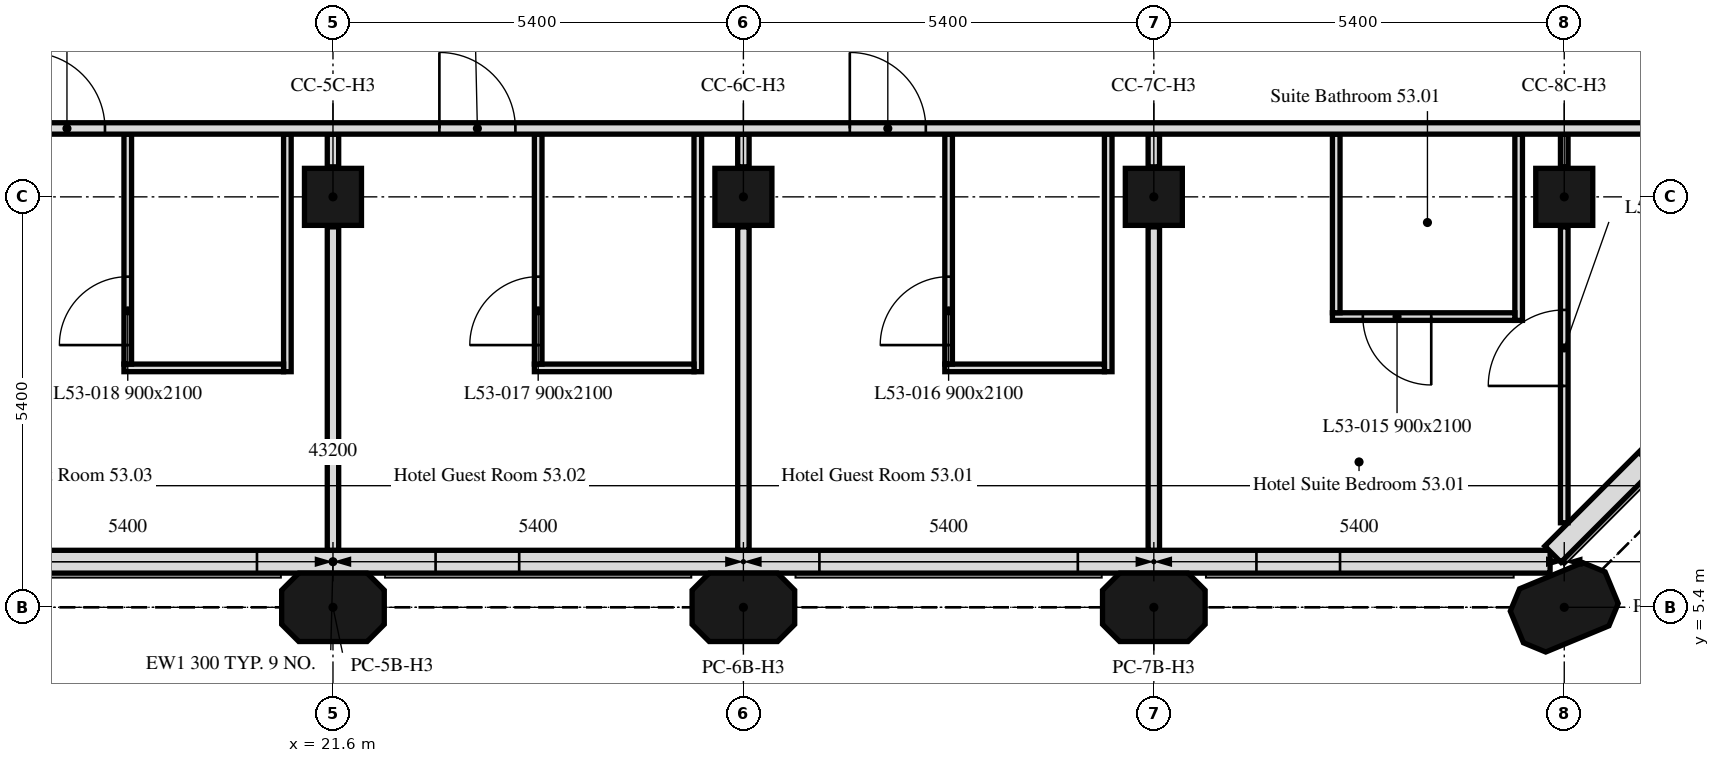
"""IFC4 building model, lengths in metres.
Left out: names, types, materials, properties, quantities, classifications, styles, units other than length and angle.
Written with IfcOpenShell. Run it as: python <this file> out.ifc"""

import sys

from ifc_helpers import new_model, si_unit, direction, frame, frame_2d, origin, origin_2d, place, context, subcontext, project, spatial, polyline, rectangle, outline, extrude, element, fill, save


model = new_model("IFC4")
c1 = context("Model", 3, precision=1e-05, world=origin(), true_north=direction((0.0, 1.0)))
c2 = subcontext(c1, "Body", "Model", "MODEL_VIEW")
j1 = project(units=[si_unit("LENGTHUNIT", "METRE"), si_unit("PLANEANGLEUNIT", "RADIAN")], contexts=[c1])
p1 = place(None, origin())
s1 = spatial("IfcSite", under=j1, at=p1, CompositionType="ELEMENT")
p2 = place(p1, origin())
s2 = spatial("IfcBuilding", under=s1, at=p2, CompositionType="ELEMENT")
p3 = place(p2, frame((0.0, 0.0, 213.7)))
s3 = spatial("IfcBuildingStorey", under=s2, at=p3, CompositionType="ELEMENT", Elevation=213.7)
for number, where, z_axis, x_axis in (
    (1, (21.6, 5.4, 0.0), (0.0, 0.0, 1.0), (1.0, 0.0, 0.0)),
    (2, (27.0, 5.4, 0.0), (0.0, 0.0, 1.0), (1.0, 0.0, 0.0)),
    (3, (32.4, 5.4, 0.0), (0.0, 0.0, 1.0), (1.0, 0.0, 0.0)),
    (4, (37.8, 5.4, 0.0), (0.0, 0.0, 1.0), (0.924, 0.383, 0.0)),
):
    element("IfcColumn", number, at=place(p3, frame(where, z_axis=z_axis, x_axis=x_axis)), inside=s3, PredefinedType="COLUMN", context=c2, shape_type="SweptSolid", body=[
        extrude(outline(polyline([(-0.45, -0.45), (0.45, -0.45), (0.675, -0.225), (0.675, 0.225), (0.45, 0.45), (-0.45, 0.45), (-0.675, 0.225), (-0.675, -0.225), (-0.45, -0.45)])), origin(), (0.0, 0.0, 1.0), 3.0),
    ])
for number, where, z_axis, x_axis in (
    (5, (21.6, 10.8, 0.0), (0.0, 0.0, 1.0), (1.0, 0.0, 0.0)),
    (6, (27.0, 10.8, 0.0), (0.0, 0.0, 1.0), (1.0, 0.0, 0.0)),
    (7, (32.4, 10.8, 0.0), (0.0, 0.0, 1.0), (1.0, 0.0, 0.0)),
    (8, (37.8, 10.8, 0.0), (0.0, 0.0, 1.0), (1.0, 0.0, 0.0)),
):
    element("IfcColumn", number, at=place(p3, frame(where, z_axis=z_axis, x_axis=x_axis)), inside=s3, PredefinedType="COLUMN", context=c2, shape_type="SweptSolid", body=[
        extrude(rectangle(XDim=0.75, YDim=0.75, at=origin_2d()), origin(), (0.0, 0.0, 1.0), 3.0),
    ])
p4 = place(p3, frame((5.586, 6.0, 0.0), z_axis=(0.0, 0.0, 1.0), x_axis=(1.0, 0.0, 0.0)))
e9 = element("IfcWall", 9, at=p4, inside=s3, PredefinedType="SOLIDWALL", context=c2, shape_type="SweptSolid", body=[
    extrude(rectangle(XDim=32.027, YDim=0.3, at=frame_2d((16.014, 0.0))), origin(), (0.0, 0.0, 1.0), 3.0),
])
p5 = place(p4, frame((0.814, 0.0, 0.9)))
e10 = element("IfcOpeningElement", 10, at=p5, cuts=e9, PredefinedType="OPENING", context=c2, shape_type="SweptSolid", body=[
    extrude(rectangle(XDim=3.4, YDim=1.7, at=frame_2d((1.7, 0.85))), frame((0.0, 0.16, 0.0), z_axis=(0.0, -1.0, 0.0), x_axis=(1.0, 0.0, 0.0)), (0.0, 0.0, 1.0), 0.32),
])
p6 = place(p4, frame((6.564, 0.0, 0.9)))
e11 = element("IfcOpeningElement", 11, at=p6, cuts=e9, PredefinedType="OPENING", context=c2, shape_type="SweptSolid", body=[
    extrude(rectangle(XDim=1.1, YDim=1.7, at=frame_2d((0.55, 0.85))), frame((0.0, 0.16, 0.0), z_axis=(0.0, -1.0, 0.0), x_axis=(1.0, 0.0, 0.0)), (0.0, 0.0, 1.0), 0.32),
])
p7 = place(p4, frame((11.614, 0.0, 0.9)))
e12 = element("IfcOpeningElement", 12, at=p7, cuts=e9, PredefinedType="OPENING", context=c2, shape_type="SweptSolid", body=[
    extrude(rectangle(XDim=3.4, YDim=1.7, at=frame_2d((1.7, 0.85))), frame((0.0, 0.16, 0.0), z_axis=(0.0, -1.0, 0.0), x_axis=(1.0, 0.0, 0.0)), (0.0, 0.0, 1.0), 0.32),
])
p8 = place(p4, frame((17.364, 0.0, 0.9)))
e13 = element("IfcOpeningElement", 13, at=p8, cuts=e9, PredefinedType="OPENING", context=c2, shape_type="SweptSolid", body=[
    extrude(rectangle(XDim=1.1, YDim=1.7, at=frame_2d((0.55, 0.85))), frame((0.0, 0.16, 0.0), z_axis=(0.0, -1.0, 0.0), x_axis=(1.0, 0.0, 0.0)), (0.0, 0.0, 1.0), 0.32),
])
p9 = place(p4, frame((22.414, 0.0, 0.9)))
e14 = element("IfcOpeningElement", 14, at=p9, cuts=e9, PredefinedType="OPENING", context=c2, shape_type="SweptSolid", body=[
    extrude(rectangle(XDim=3.4, YDim=1.7, at=frame_2d((1.7, 0.85))), frame((0.0, 0.16, 0.0), z_axis=(0.0, -1.0, 0.0), x_axis=(1.0, 0.0, 0.0)), (0.0, 0.0, 1.0), 0.32),
])
p10 = place(p4, frame((28.164, 0.0, 0.9)))
e15 = element("IfcOpeningElement", 15, at=p10, cuts=e9, PredefinedType="OPENING", context=c2, shape_type="SweptSolid", body=[
    extrude(rectangle(XDim=1.1, YDim=1.7, at=frame_2d((0.55, 0.85))), frame((0.0, 0.16, 0.0), z_axis=(0.0, -1.0, 0.0), x_axis=(1.0, 0.0, 0.0)), (0.0, 0.0, 1.0), 0.32),
])
p11 = place(p3, frame((37.65, 6.099, 0.0), z_axis=(0.0, 0.0, 1.0), x_axis=(0.707106781187, 0.707106781187, 0.0)))
e16 = element("IfcWall", 16, at=p11, inside=s3, PredefinedType="SOLIDWALL", context=c2, shape_type="SweptSolid", body=[
    extrude(rectangle(XDim=6.86, YDim=0.3, at=frame_2d((3.43, 0.0))), origin(), (0.0, 0.0, 1.0), 3.0),
])
p12 = place(p11, frame((1.73, 0.0, 0.9)))
e17 = element("IfcOpeningElement", 17, at=p12, cuts=e16, PredefinedType="OPENING", context=c2, shape_type="SweptSolid", body=[
    extrude(rectangle(XDim=3.4, YDim=1.7, at=frame_2d((1.7, 0.85))), frame((0.0, 0.16, 0.0), z_axis=(0.0, -1.0, 0.0), x_axis=(1.0, 0.0, 0.0)), (0.0, 0.0, 1.0), 0.32),
])
p13 = place(p3, frame((37.8, 6.512, 0.0), z_axis=(0.0, 0.0, 1.0), x_axis=(0.0, 1.0, 0.0)))
e18 = element("IfcWall", 18, at=p13, inside=s3, PredefinedType="PARTITIONING", context=c2, shape_type="SweptSolid", body=[
    extrude(rectangle(XDim=3.893, YDim=0.1, at=frame_2d((1.946, 0.0))), origin(), (0.0, 0.0, 1.0), 3.0),
])
p14 = place(p13, frame((1.8, 0.0, 0.0)))
e19 = element("IfcOpeningElement", 19, at=p14, cuts=e18, PredefinedType="OPENING", context=c2, shape_type="SweptSolid", body=[
    extrude(rectangle(XDim=1.0, YDim=2.1, at=frame_2d((0.5, 1.05))), frame((0.0, 0.05, 0.0), z_axis=(0.0, -1.0, 0.0), x_axis=(1.0, 0.0, 0.0)), (0.0, 0.0, 1.0), 0.1),
])
p15 = place(p3, frame((37.8, 11.195, 0.0), z_axis=(0.0, 0.0, 1.0), x_axis=(0.0, 1.0, 0.0)))
e20 = element("IfcWall", 20, at=p15, inside=s3, PredefinedType="PARTITIONING", context=c2, shape_type="SweptSolid", body=[
    extrude(rectangle(XDim=0.43, YDim=0.1, at=frame_2d((0.215, 0.0))), origin(), (0.0, 0.0, 1.0), 3.0),
])
p16 = place(p3, frame((37.2, 11.625, 0.0), z_axis=(0.0, 0.0, 1.0), x_axis=(0.0, -1.0, 0.0)))
e21 = element("IfcWall", 21, at=p16, inside=s3, PredefinedType="PARTITIONING", context=c2, shape_type="SweptSolid", body=[
    extrude(rectangle(XDim=2.45, YDim=0.1, at=frame_2d((1.225, 0.0))), origin(), (0.0, 0.0, 1.0), 3.0),
])
p17 = place(p3, frame((37.15, 9.225, 0.0), z_axis=(0.0, 0.0, 1.0), x_axis=(-1.0, 0.0, 0.0)))
e22 = element("IfcWall", 22, at=p17, inside=s3, PredefinedType="PARTITIONING", context=c2, shape_type="SweptSolid", body=[
    extrude(rectangle(XDim=2.4, YDim=0.1, at=frame_2d((1.2, 0.0))), origin(), (0.0, 0.0, 1.0), 3.0),
])
p18 = place(p17, frame((1.1, 0.0, 0.0)))
e23 = element("IfcOpeningElement", 23, at=p18, cuts=e22, PredefinedType="OPENING", context=c2, shape_type="SweptSolid", body=[
    extrude(rectangle(XDim=0.9, YDim=2.1, at=frame_2d((0.45, 1.05))), frame((0.0, 0.05, 0.0), z_axis=(0.0, -1.0, 0.0), x_axis=(1.0, 0.0, 0.0)), (0.0, 0.0, 1.0), 0.1),
])
p19 = place(p3, frame((34.8, 9.275, 0.0), z_axis=(0.0, 0.0, 1.0), x_axis=(0.0, 1.0, 0.0)))
e24 = element("IfcWall", 24, at=p19, inside=s3, PredefinedType="PARTITIONING", context=c2, shape_type="SweptSolid", body=[
    extrude(rectangle(XDim=2.35, YDim=0.1, at=frame_2d((1.175, 0.0))), origin(), (0.0, 0.0, 1.0), 3.0),
])
p20 = place(p3, frame((32.4, 11.625, 0.0), z_axis=(0.0, 0.0, 1.0), x_axis=(0.0, -1.0, 0.0)))
e25 = element("IfcWall", 25, at=p20, inside=s3, PredefinedType="PARTITIONING", context=c2, shape_type="SweptSolid", body=[
    extrude(rectangle(XDim=0.43, YDim=0.15, at=frame_2d((0.215, 0.0))), origin(), (0.0, 0.0, 1.0), 3.0),
])
p21 = place(p3, frame((32.4, 10.405, 0.0), z_axis=(0.0, 0.0, 1.0), x_axis=(0.0, -1.0, 0.0)))
e26 = element("IfcWall", 26, at=p21, inside=s3, PredefinedType="PARTITIONING", context=c2, shape_type="SweptSolid", body=[
    extrude(rectangle(XDim=4.254, YDim=0.15, at=frame_2d((2.127, 0.0))), origin(), (0.0, 0.0, 1.0), 3.0),
])
p22 = place(p3, frame((31.8, 11.625, 0.0), z_axis=(0.0, 0.0, 1.0), x_axis=(0.0, -1.0, 0.0)))
e27 = element("IfcWall", 27, at=p22, inside=s3, PredefinedType="PARTITIONING", context=c2, shape_type="SweptSolid", body=[
    extrude(rectangle(XDim=3.125, YDim=0.1, at=frame_2d((1.562, 0.0))), origin(), (0.0, 0.0, 1.0), 3.0),
])
p23 = place(p3, frame((31.75, 8.55, 0.0), z_axis=(0.0, 0.0, 1.0), x_axis=(-1.0, 0.0, 0.0)))
e28 = element("IfcWall", 28, at=p23, inside=s3, PredefinedType="PARTITIONING", context=c2, shape_type="SweptSolid", body=[
    extrude(rectangle(XDim=2.1, YDim=0.1, at=frame_2d((1.05, 0.0))), origin(), (0.0, 0.0, 1.0), 3.0),
])
p24 = place(p3, frame((29.7, 8.6, 0.0), z_axis=(0.0, 0.0, 1.0), x_axis=(0.0, 1.0, 0.0)))
e29 = element("IfcWall", 29, at=p24, inside=s3, PredefinedType="PARTITIONING", context=c2, shape_type="SweptSolid", body=[
    extrude(rectangle(XDim=3.025, YDim=0.1, at=frame_2d((1.512, 0.0))), origin(), (0.0, 0.0, 1.0), 3.0),
])
p25 = place(p24, frame((0.25, 0.0, 0.0)))
e30 = element("IfcOpeningElement", 30, at=p25, cuts=e29, PredefinedType="OPENING", context=c2, shape_type="SweptSolid", body=[
    extrude(rectangle(XDim=0.9, YDim=2.1, at=frame_2d((0.45, 1.05))), frame((0.0, 0.05, 0.0), z_axis=(0.0, -1.0, 0.0), x_axis=(1.0, 0.0, 0.0)), (0.0, 0.0, 1.0), 0.1),
])
p26 = place(p3, frame((27.0, 11.625, 0.0), z_axis=(0.0, 0.0, 1.0), x_axis=(0.0, -1.0, 0.0)))
e31 = element("IfcWall", 31, at=p26, inside=s3, PredefinedType="PARTITIONING", context=c2, shape_type="SweptSolid", body=[
    extrude(rectangle(XDim=0.43, YDim=0.15, at=frame_2d((0.215, 0.0))), origin(), (0.0, 0.0, 1.0), 3.0),
])
p27 = place(p3, frame((27.0, 10.405, 0.0), z_axis=(0.0, 0.0, 1.0), x_axis=(0.0, -1.0, 0.0)))
e32 = element("IfcWall", 32, at=p27, inside=s3, PredefinedType="PARTITIONING", context=c2, shape_type="SweptSolid", body=[
    extrude(rectangle(XDim=4.254, YDim=0.15, at=frame_2d((2.127, 0.0))), origin(), (0.0, 0.0, 1.0), 3.0),
])
p28 = place(p3, frame((26.4, 11.625, 0.0), z_axis=(0.0, 0.0, 1.0), x_axis=(0.0, -1.0, 0.0)))
e33 = element("IfcWall", 33, at=p28, inside=s3, PredefinedType="PARTITIONING", context=c2, shape_type="SweptSolid", body=[
    extrude(rectangle(XDim=3.125, YDim=0.1, at=frame_2d((1.562, 0.0))), origin(), (0.0, 0.0, 1.0), 3.0),
])
p29 = place(p3, frame((26.35, 8.55, 0.0), z_axis=(0.0, 0.0, 1.0), x_axis=(-1.0, 0.0, 0.0)))
e34 = element("IfcWall", 34, at=p29, inside=s3, PredefinedType="PARTITIONING", context=c2, shape_type="SweptSolid", body=[
    extrude(rectangle(XDim=2.1, YDim=0.1, at=frame_2d((1.05, 0.0))), origin(), (0.0, 0.0, 1.0), 3.0),
])
p30 = place(p3, frame((24.3, 8.6, 0.0), z_axis=(0.0, 0.0, 1.0), x_axis=(0.0, 1.0, 0.0)))
e35 = element("IfcWall", 35, at=p30, inside=s3, PredefinedType="PARTITIONING", context=c2, shape_type="SweptSolid", body=[
    extrude(rectangle(XDim=3.025, YDim=0.1, at=frame_2d((1.512, 0.0))), origin(), (0.0, 0.0, 1.0), 3.0),
])
p31 = place(p30, frame((0.25, 0.0, 0.0)))
e36 = element("IfcOpeningElement", 36, at=p31, cuts=e35, PredefinedType="OPENING", context=c2, shape_type="SweptSolid", body=[
    extrude(rectangle(XDim=0.9, YDim=2.1, at=frame_2d((0.45, 1.05))), frame((0.0, 0.05, 0.0), z_axis=(0.0, -1.0, 0.0), x_axis=(1.0, 0.0, 0.0)), (0.0, 0.0, 1.0), 0.1),
])
p32 = place(p3, frame((21.6, 11.625, 0.0), z_axis=(0.0, 0.0, 1.0), x_axis=(0.0, -1.0, 0.0)))
e37 = element("IfcWall", 37, at=p32, inside=s3, PredefinedType="PARTITIONING", context=c2, shape_type="SweptSolid", body=[
    extrude(rectangle(XDim=0.43, YDim=0.15, at=frame_2d((0.215, 0.0))), origin(), (0.0, 0.0, 1.0), 3.0),
])
p33 = place(p3, frame((21.6, 10.405, 0.0), z_axis=(0.0, 0.0, 1.0), x_axis=(0.0, -1.0, 0.0)))
e38 = element("IfcWall", 38, at=p33, inside=s3, PredefinedType="PARTITIONING", context=c2, shape_type="SweptSolid", body=[
    extrude(rectangle(XDim=4.254, YDim=0.15, at=frame_2d((2.127, 0.0))), origin(), (0.0, 0.0, 1.0), 3.0),
])
p34 = place(p3, frame((21.0, 11.625, 0.0), z_axis=(0.0, 0.0, 1.0), x_axis=(0.0, -1.0, 0.0)))
e39 = element("IfcWall", 39, at=p34, inside=s3, PredefinedType="PARTITIONING", context=c2, shape_type="SweptSolid", body=[
    extrude(rectangle(XDim=3.125, YDim=0.1, at=frame_2d((1.562, 0.0))), origin(), (0.0, 0.0, 1.0), 3.0),
])
p35 = place(p3, frame((20.95, 8.55, 0.0), z_axis=(0.0, 0.0, 1.0), x_axis=(-1.0, 0.0, 0.0)))
e40 = element("IfcWall", 40, at=p35, inside=s3, PredefinedType="PARTITIONING", context=c2, shape_type="SweptSolid", body=[
    extrude(rectangle(XDim=2.1, YDim=0.1, at=frame_2d((1.05, 0.0))), origin(), (0.0, 0.0, 1.0), 3.0),
])
p36 = place(p3, frame((18.9, 8.6, 0.0), z_axis=(0.0, 0.0, 1.0), x_axis=(0.0, 1.0, 0.0)))
e41 = element("IfcWall", 41, at=p36, inside=s3, PredefinedType="PARTITIONING", context=c2, shape_type="SweptSolid", body=[
    extrude(rectangle(XDim=3.025, YDim=0.1, at=frame_2d((1.512, 0.0))), origin(), (0.0, 0.0, 1.0), 3.0),
])
p37 = place(p36, frame((0.25, 0.0, 0.0)))
e42 = element("IfcOpeningElement", 42, at=p37, cuts=e41, PredefinedType="OPENING", context=c2, shape_type="SweptSolid", body=[
    extrude(rectangle(XDim=0.9, YDim=2.1, at=frame_2d((0.45, 1.05))), frame((0.0, 0.05, 0.0), z_axis=(0.0, -1.0, 0.0), x_axis=(1.0, 0.0, 0.0)), (0.0, 0.0, 1.0), 0.1),
])
p38 = place(p3, frame((0.751, 11.7, 0.0), z_axis=(0.0, 0.0, 1.0), x_axis=(1.0, 0.0, 0.0)))
e43 = element("IfcWall", 43, at=p38, inside=s3, PredefinedType="PARTITIONING", context=c2, shape_type="SweptSolid", body=[
    extrude(rectangle(XDim=41.698, YDim=0.15, at=frame_2d((20.849, 0.0))), origin(), (0.0, 0.0, 1.0), 3.0),
])
p39 = place(p38, frame((39.249, 0.0, 0.0)))
e44 = element("IfcOpeningElement", 44, at=p39, cuts=e43, PredefinedType="OPENING", context=c2, shape_type="SweptSolid", body=[
    extrude(rectangle(XDim=1.0, YDim=2.1, at=frame_2d((0.5, 1.05))), frame((0.0, 0.075, 0.0), z_axis=(0.0, -1.0, 0.0), x_axis=(1.0, 0.0, 0.0)), (0.0, 0.0, 1.0), 0.15),
])
p40 = place(p38, frame((27.649, 0.0, 0.0)))
e45 = element("IfcOpeningElement", 45, at=p40, cuts=e43, PredefinedType="OPENING", context=c2, shape_type="SweptSolid", body=[
    extrude(rectangle(XDim=1.0, YDim=2.1, at=frame_2d((0.5, 1.05))), frame((0.0, 0.075, 0.0), z_axis=(0.0, -1.0, 0.0), x_axis=(1.0, 0.0, 0.0)), (0.0, 0.0, 1.0), 0.15),
])
p41 = place(p38, frame((22.249, 0.0, 0.0)))
e46 = element("IfcOpeningElement", 46, at=p41, cuts=e43, PredefinedType="OPENING", context=c2, shape_type="SweptSolid", body=[
    extrude(rectangle(XDim=1.0, YDim=2.1, at=frame_2d((0.5, 1.05))), frame((0.0, 0.075, 0.0), z_axis=(0.0, -1.0, 0.0), x_axis=(1.0, 0.0, 0.0)), (0.0, 0.0, 1.0), 0.15),
])
p42 = place(p38, frame((16.849, 0.0, 0.0)))
e47 = element("IfcOpeningElement", 47, at=p42, cuts=e43, PredefinedType="OPENING", context=c2, shape_type="SweptSolid", body=[
    extrude(rectangle(XDim=1.0, YDim=2.1, at=frame_2d((0.5, 1.05))), frame((0.0, 0.075, 0.0), z_axis=(0.0, -1.0, 0.0), x_axis=(1.0, 0.0, 0.0)), (0.0, 0.0, 1.0), 0.15),
])
p43 = place(p38, frame((11.449, 0.0, 0.0)))
e48 = element("IfcOpeningElement", 48, at=p43, cuts=e43, PredefinedType="OPENING", context=c2, shape_type="SweptSolid", body=[
    extrude(rectangle(XDim=1.0, YDim=2.1, at=frame_2d((0.5, 1.05))), frame((0.0, 0.075, 0.0), z_axis=(0.0, -1.0, 0.0), x_axis=(1.0, 0.0, 0.0)), (0.0, 0.0, 1.0), 0.15),
])
p44 = place(p38, frame((2.744, 0.0, 0.0)))
e49 = element("IfcOpeningElement", 49, at=p44, cuts=e43, PredefinedType="OPENING", context=c2, shape_type="SweptSolid", body=[
    extrude(rectangle(XDim=1.0, YDim=2.1, at=frame_2d((0.5, 1.05))), frame((0.0, 0.075, 0.0), z_axis=(0.0, -1.0, 0.0), x_axis=(1.0, 0.0, 0.0)), (0.0, 0.0, 1.0), 0.15),
])
p45 = place(p7, origin())
e50 = element("IfcWindow", 50, at=p45, inside=s3, PartitioningType="SINGLE_PANEL", PredefinedType="WINDOW", context=c2, shape_type="SweptSolid", body=[
    extrude(rectangle(XDim=3.4, YDim=1.7, at=frame_2d((1.7, 0.85))), frame((0.0, 0.03, 0.0), z_axis=(0.0, -1.0, 0.0), x_axis=(1.0, 0.0, 0.0)), (0.0, 0.0, 1.0), 0.06),
])
fill(e12, e50)
p46 = place(p8, origin())
e51 = element("IfcWindow", 51, at=p46, inside=s3, PartitioningType="SINGLE_PANEL", PredefinedType="WINDOW", context=c2, shape_type="SweptSolid", body=[
    extrude(rectangle(XDim=1.1, YDim=1.7, at=frame_2d((0.55, 0.85))), frame((0.0, 0.03, 0.0), z_axis=(0.0, -1.0, 0.0), x_axis=(1.0, 0.0, 0.0)), (0.0, 0.0, 1.0), 0.06),
])
fill(e13, e51)
p47 = place(p9, origin())
e52 = element("IfcWindow", 52, at=p47, inside=s3, PartitioningType="SINGLE_PANEL", PredefinedType="WINDOW", context=c2, shape_type="SweptSolid", body=[
    extrude(rectangle(XDim=3.4, YDim=1.7, at=frame_2d((1.7, 0.85))), frame((0.0, 0.03, 0.0), z_axis=(0.0, -1.0, 0.0), x_axis=(1.0, 0.0, 0.0)), (0.0, 0.0, 1.0), 0.06),
])
fill(e14, e52)
p48 = place(p10, origin())
e53 = element("IfcWindow", 53, at=p48, inside=s3, PartitioningType="SINGLE_PANEL", PredefinedType="WINDOW", context=c2, shape_type="SweptSolid", body=[
    extrude(rectangle(XDim=1.1, YDim=1.7, at=frame_2d((0.55, 0.85))), frame((0.0, 0.03, 0.0), z_axis=(0.0, -1.0, 0.0), x_axis=(1.0, 0.0, 0.0)), (0.0, 0.0, 1.0), 0.06),
])
fill(e15, e53)
p49 = place(p18, origin())
e54 = element("IfcDoor", 54, at=p49, inside=s3, OperationType="SINGLE_SWING_RIGHT", PredefinedType="DOOR", context=c2, shape_type="SweptSolid", body=[
    extrude(rectangle(XDim=0.9, YDim=2.1, at=frame_2d((0.45, 1.05))), frame((0.0, 0.025, 0.0), z_axis=(0.0, -1.0, 0.0), x_axis=(1.0, 0.0, 0.0)), (0.0, 0.0, 1.0), 0.05),
])
fill(e23, e54)
p50 = place(p25, origin())
e55 = element("IfcDoor", 55, at=p50, inside=s3, OperationType="SINGLE_SWING_RIGHT", PredefinedType="DOOR", context=c2, shape_type="SweptSolid", body=[
    extrude(rectangle(XDim=0.9, YDim=2.1, at=frame_2d((0.45, 1.05))), frame((0.0, 0.025, 0.0), z_axis=(0.0, -1.0, 0.0), x_axis=(1.0, 0.0, 0.0)), (0.0, 0.0, 1.0), 0.05),
])
fill(e30, e55)
p51 = place(p31, origin())
e56 = element("IfcDoor", 56, at=p51, inside=s3, OperationType="SINGLE_SWING_LEFT", PredefinedType="DOOR", context=c2, shape_type="SweptSolid", body=[
    extrude(rectangle(XDim=0.9, YDim=2.1, at=frame_2d((0.45, 1.05))), frame((0.0, 0.025, 0.0), z_axis=(0.0, -1.0, 0.0), x_axis=(1.0, 0.0, 0.0)), (0.0, 0.0, 1.0), 0.05),
])
fill(e36, e56)
p52 = place(p37, origin())
e57 = element("IfcDoor", 57, at=p52, inside=s3, OperationType="SINGLE_SWING_LEFT", PredefinedType="DOOR", context=c2, shape_type="SweptSolid", body=[
    extrude(rectangle(XDim=0.9, YDim=2.1, at=frame_2d((0.45, 1.05))), frame((0.0, 0.025, 0.0), z_axis=(0.0, -1.0, 0.0), x_axis=(1.0, 0.0, 0.0)), (0.0, 0.0, 1.0), 0.05),
])
fill(e42, e57)
p53 = place(p14, origin())
e58 = element("IfcDoor", 58, at=p53, inside=s3, OperationType="SINGLE_SWING_RIGHT", PredefinedType="DOOR", context=c2, shape_type="SweptSolid", body=[
    extrude(rectangle(XDim=1.0, YDim=2.1, at=frame_2d((0.5, 1.05))), frame((0.0, 0.025, 0.0), z_axis=(0.0, -1.0, 0.0), x_axis=(1.0, 0.0, 0.0)), (0.0, 0.0, 1.0), 0.05),
])
fill(e19, e58)
p54 = place(p40, origin())
e59 = element("IfcDoor", 59, at=p54, inside=s3, OperationType="SINGLE_SWING_LEFT", PredefinedType="DOOR", context=c2, shape_type="SweptSolid", body=[
    extrude(rectangle(XDim=1.0, YDim=2.1, at=frame_2d((0.5, 1.05))), frame((0.0, 0.025, 0.0), z_axis=(0.0, -1.0, 0.0), x_axis=(1.0, 0.0, 0.0)), (0.0, 0.0, 1.0), 0.05),
])
fill(e45, e59)
p55 = place(p41, origin())
e60 = element("IfcDoor", 60, at=p55, inside=s3, OperationType="SINGLE_SWING_LEFT", PredefinedType="DOOR", context=c2, shape_type="SweptSolid", body=[
    extrude(rectangle(XDim=1.0, YDim=2.1, at=frame_2d((0.5, 1.05))), frame((0.0, 0.025, 0.0), z_axis=(0.0, -1.0, 0.0), x_axis=(1.0, 0.0, 0.0)), (0.0, 0.0, 1.0), 0.05),
])
fill(e46, e60)
p56 = place(p42, origin())
e61 = element("IfcDoor", 61, at=p56, inside=s3, OperationType="SINGLE_SWING_RIGHT", PredefinedType="DOOR", context=c2, shape_type="SweptSolid", body=[
    extrude(rectangle(XDim=1.0, YDim=2.1, at=frame_2d((0.5, 1.05))), frame((0.0, 0.025, 0.0), z_axis=(0.0, -1.0, 0.0), x_axis=(1.0, 0.0, 0.0)), (0.0, 0.0, 1.0), 0.05),
])
fill(e47, e61)
save(model, sys.argv[1])
